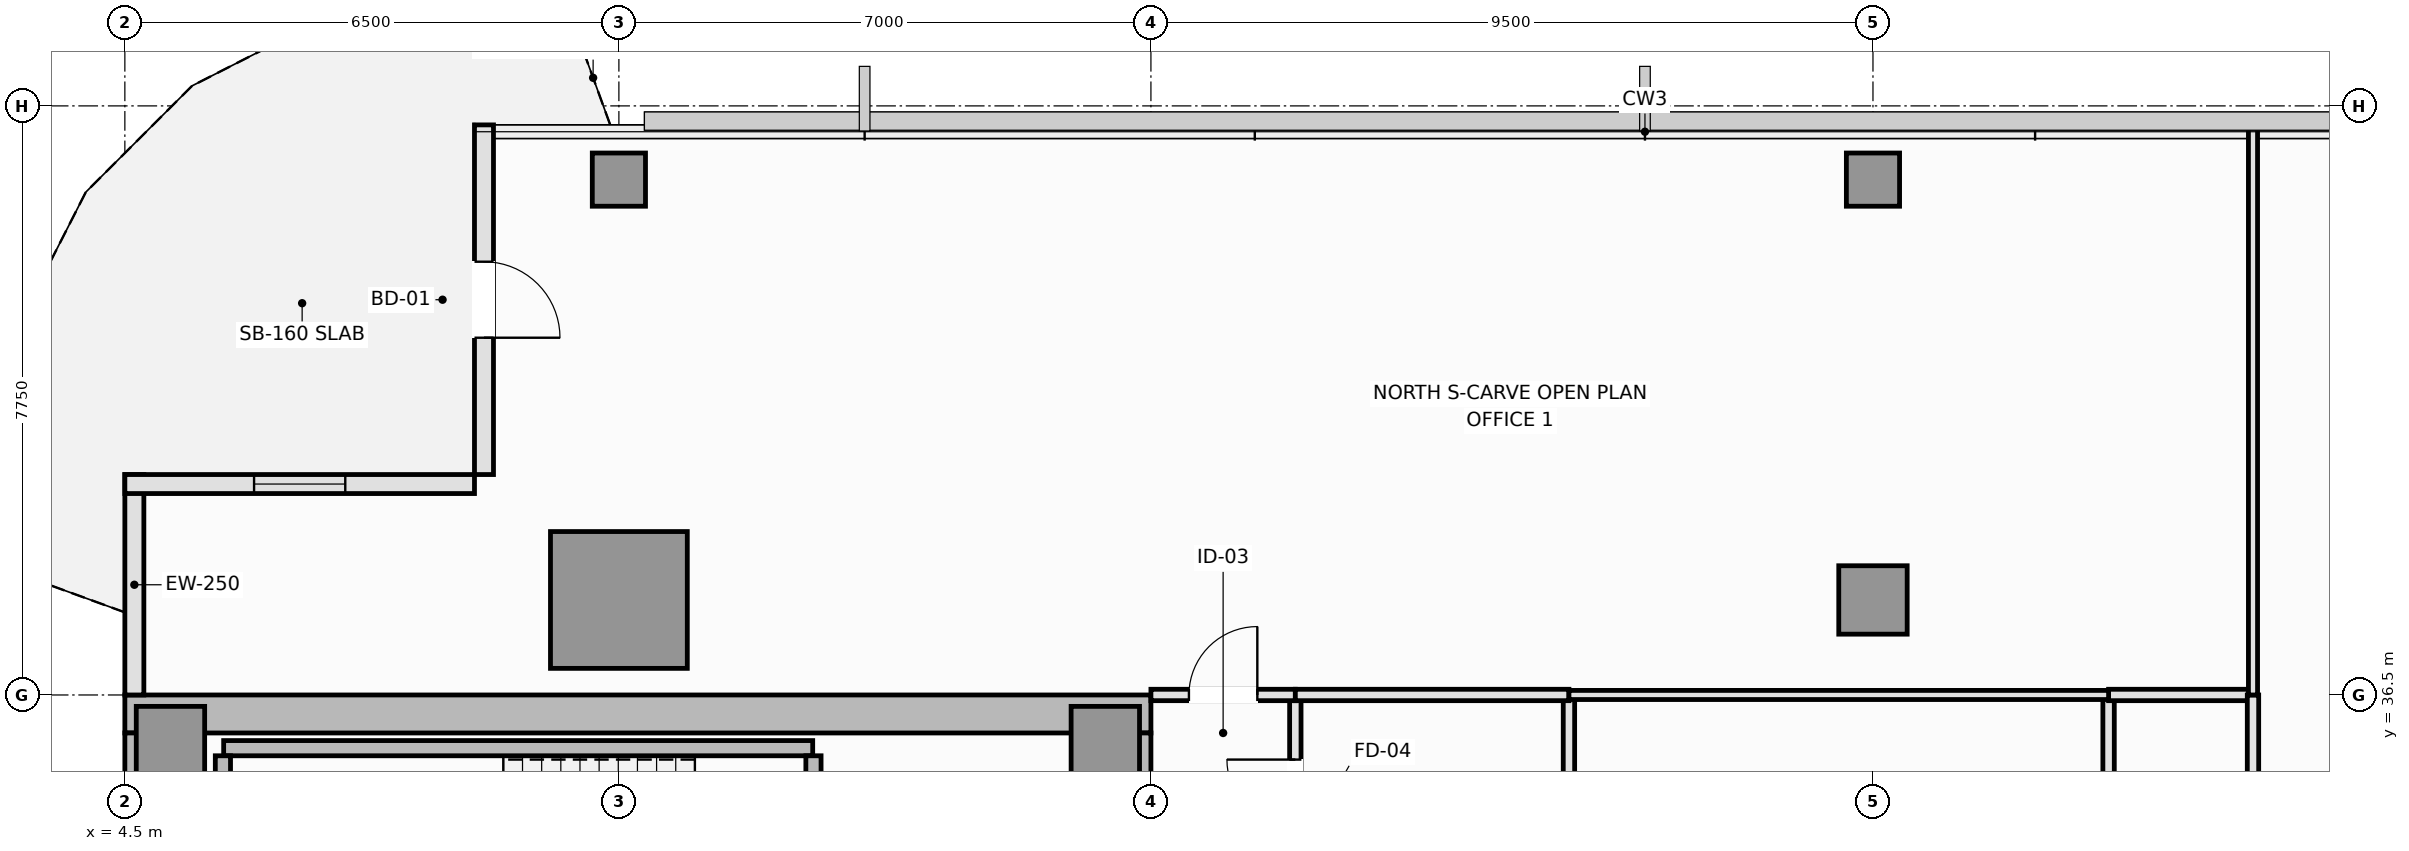
"""IFC4 building model, lengths in metres.
Left out: names, types, materials, properties, quantities, classifications, styles, units other than length and angle.
Written with IfcOpenShell. Run it as: python <this file> out.ifc"""

import sys

from ifc_helpers import new_model, si_unit, direction, frame, frame_2d, origin, origin_2d, place, context, subcontext, project, spatial, rectangle, extrude, element, fill, save


model = new_model("IFC4")
c1 = context("Model", 3, precision=1e-05, world=origin(), true_north=direction((0.0, 1.0)))
c2 = subcontext(c1, "Body", "Model", "MODEL_VIEW")
j1 = project(units=[si_unit("LENGTHUNIT", "METRE"), si_unit("PLANEANGLEUNIT", "RADIAN")], contexts=[c1])
p1 = place(None, origin())
s1 = spatial("IfcSite", under=j1, at=p1, CompositionType="ELEMENT")
p2 = place(p1, origin())
s2 = spatial("IfcBuilding", under=s1, at=p2, CompositionType="ELEMENT")
p3 = place(p2, frame((0.0, 0.0, 259.9)))
s3 = spatial("IfcBuildingStorey", under=s2, at=p3, CompositionType="ELEMENT", Elevation=259.9)
p4 = place(p3, frame((4.5, 36.25, 0.0), z_axis=(0.0, 0.0, 1.0), x_axis=(1.0, 0.0, 0.0)))
e1 = element("IfcWall", 1, at=p4, inside=s3, PredefinedType="SHEAR", context=c2, shape_type="SweptSolid", body=[
    extrude(rectangle(XDim=13.5, YDim=0.5, at=frame_2d((6.75, 0.0))), origin(), (0.0, 0.0, 1.0), 3.55),
])
p5 = place(p3, frame((4.75, 14.5, 0.0), z_axis=(0.0, 0.0, 1.0), x_axis=(0.0, 1.0, 0.0)))
e2 = element("IfcWall", 2, at=p5, inside=s3, PredefinedType="SHEAR", context=c2, shape_type="SweptSolid", body=[
    extrude(rectangle(XDim=21.5, YDim=0.5, at=frame_2d((10.75, 0.0))), origin(), (0.0, 0.0, 1.0), 3.55),
])
p6 = place(p3, frame((17.75, 27.05, 0.0), z_axis=(0.0, 0.0, 1.0), x_axis=(0.0, 1.0, 0.0)))
e3 = element("IfcWall", 3, at=p6, inside=s3, PredefinedType="SHEAR", context=c2, shape_type="SweptSolid", body=[
    extrude(rectangle(XDim=8.95, YDim=0.5, at=frame_2d((4.475, 0.0))), origin(), (0.0, 0.0, 1.0), 3.55),
])
p7 = place(p6, frame((3.45, 0.0, 0.0)))
e4 = element("IfcOpeningElement", 4, at=p7, cuts=e3, PredefinedType="OPENING", context=c2, shape_type="SweptSolid", body=[
    extrude(rectangle(XDim=1.1, YDim=2.15, at=frame_2d((0.55, 1.075))), frame((0.0, 0.26, 0.0), z_axis=(0.0, -1.0, 0.0), x_axis=(1.0, 0.0, 0.0)), (0.0, 0.0, 1.0), 0.52),
])
for number, where, z_axis, x_axis in (
    (5, (5.1, 35.9, 0.0), (0.0, 0.0, 1.0), (1.0, 0.0, 0.0)),
    (6, (17.4, 35.9, 0.0), (0.0, 0.0, 1.0), (1.0, 0.0, 0.0)),
):
    element("IfcColumn", number, at=place(p3, frame(where, z_axis=z_axis, x_axis=x_axis)), inside=s3, PredefinedType="PILASTER", context=c2, shape_type="SweptSolid", body=[
        extrude(rectangle(XDim=0.9, YDim=0.9, at=origin_2d()), origin(), (0.0, 0.0, 1.0), 3.55),
    ])
p8 = place(p3, frame((11.0, 37.75, 0.0), z_axis=(0.0, 0.0, 1.0), x_axis=(1.0, 0.0, 0.0)))
e7 = element("IfcColumn", 7, at=p8, inside=s3, PredefinedType="COLUMN", context=c2, shape_type="SweptSolid", body=[
    extrude(rectangle(XDim=1.8, YDim=1.8, at=origin_2d()), origin(), (0.0, 0.0, 1.0), 3.55),
])
p9 = place(p3, frame((27.5, 37.75, 0.0), z_axis=(0.0, 0.0, 1.0), x_axis=(1.0, 0.0, 0.0)))
e8 = element("IfcColumn", 8, at=p9, inside=s3, PredefinedType="COLUMN", context=c2, shape_type="SweptSolid", body=[
    extrude(rectangle(XDim=0.9, YDim=0.9, at=origin_2d()), origin(), (0.0, 0.0, 1.0), 3.55),
])
for number, where, z_axis, x_axis in (
    (9, (11.0, 43.28, 0.0), (0.0, 0.0, 1.0), (1.0, 0.0, 0.0)),
    (10, (27.5, 43.28, 0.0), (0.0, 0.0, 1.0), (1.0, 0.0, 0.0)),
):
    element("IfcColumn", number, at=place(p3, frame(where, z_axis=z_axis, x_axis=x_axis)), inside=s3, PredefinedType="COLUMN", context=c2, shape_type="SweptSolid", body=[
        extrude(rectangle(XDim=0.7, YDim=0.7, at=origin_2d()), origin(), (0.0, 0.0, 1.0), 3.55),
    ])
p10 = place(p3, frame((4.625, 39.4, 0.0), z_axis=(0.0, 0.0, 1.0), x_axis=(0.0, -1.0, 0.0)))
e11 = element("IfcWall", 11, at=p10, inside=s3, PredefinedType="SOLIDWALL", context=c2, shape_type="SweptSolid", body=[
    extrude(rectangle(XDim=2.9, YDim=0.25, at=frame_2d((1.45, 0.0))), origin(), (0.0, 0.0, 1.0), 3.39),
])
p11 = place(p3, frame((9.225, 44.0, 0.0), z_axis=(0.0, 0.0, 1.0), x_axis=(0.0, -1.0, 0.0)))
e12 = element("IfcWall", 12, at=p11, inside=s3, PredefinedType="SOLIDWALL", context=c2, shape_type="SweptSolid", body=[
    extrude(rectangle(XDim=4.6, YDim=0.25, at=frame_2d((2.3, 0.0))), origin(), (0.0, 0.0, 1.0), 3.39),
])
p12 = place(p11, frame((1.8, 0.0, 0.0)))
e13 = element("IfcOpeningElement", 13, at=p12, cuts=e12, PredefinedType="OPENING", context=c2, shape_type="SweptSolid", body=[
    extrude(rectangle(XDim=1.0, YDim=2.2, at=frame_2d((0.5, 1.1))), frame((0.0, 0.135, 0.0), z_axis=(0.0, -1.0, 0.0), x_axis=(1.0, 0.0, 0.0)), (0.0, 0.0, 1.0), 0.27),
])
p13 = place(p3, frame((9.1, 39.275, 0.0), z_axis=(0.0, 0.0, 1.0), x_axis=(-1.0, 0.0, 0.0)))
e14 = element("IfcWall", 14, at=p13, inside=s3, PredefinedType="SOLIDWALL", context=c2, shape_type="SweptSolid", body=[
    extrude(rectangle(XDim=4.6, YDim=0.25, at=frame_2d((2.3, 0.0))), origin(), (0.0, 0.0, 1.0), 3.12),
])
p14 = place(p13, frame((1.7, 0.0, 0.9)))
e15 = element("IfcOpeningElement", 15, at=p14, cuts=e14, PredefinedType="OPENING", context=c2, shape_type="SweptSolid", body=[
    extrude(rectangle(XDim=1.2, YDim=1.8, at=frame_2d((0.6, 0.9))), frame((0.0, 0.135, 0.0), z_axis=(0.0, -1.0, 0.0), x_axis=(1.0, 0.0, 0.0)), (0.0, 0.0, 1.0), 0.27),
])
p15 = place(p3, frame((5.8, 35.8, 0.0), z_axis=(0.0, 0.0, 1.0), x_axis=(1.0, 0.0, 0.0)))
e16 = element("IfcWall", 16, at=p15, inside=s3, PredefinedType="SOLIDWALL", context=c2, shape_type="SweptSolid", body=[
    extrude(rectangle(XDim=7.75, YDim=0.2, at=frame_2d((3.875, 0.0))), origin(), (0.0, 0.0, 1.0), 3.55),
])
p16 = place(p3, frame((5.79, 32.65, 0.0), z_axis=(0.0, 0.0, 1.0), x_axis=(0.0, 1.0, 0.0)))
e17 = element("IfcWall", 17, at=p16, inside=s3, PredefinedType="SOLIDWALL", context=c2, shape_type="SweptSolid", body=[
    extrude(rectangle(XDim=3.05, YDim=0.2, at=frame_2d((1.525, 0.0))), origin(), (0.0, 0.0, 1.0), 3.55),
])
p17 = place(p3, frame((13.56, 32.65, 0.0), z_axis=(0.0, 0.0, 1.0), x_axis=(0.0, 1.0, 0.0)))
e18 = element("IfcWall", 18, at=p17, inside=s3, PredefinedType="SOLIDWALL", context=c2, shape_type="SweptSolid", body=[
    extrude(rectangle(XDim=3.05, YDim=0.2, at=frame_2d((1.525, 0.0))), origin(), (0.0, 0.0, 1.0), 3.55),
])
p18 = place(p17, frame((0.95, 0.0, 0.0)))
e19 = element("IfcOpeningElement", 19, at=p18, cuts=e18, PredefinedType="OPENING", context=c2, shape_type="SweptSolid", body=[
    extrude(rectangle(XDim=1.15, YDim=2.15, at=frame_2d((0.575, 1.075))), frame((0.0, 0.11, 0.0), z_axis=(0.0, -1.0, 0.0), x_axis=(1.0, 0.0, 0.0)), (0.0, 0.0, 1.0), 0.22),
])
p19 = place(p3, frame((19.9, 33.9, 0.0), z_axis=(0.0, 0.0, 1.0), x_axis=(0.0, 1.0, 0.0)))
e20 = element("IfcWall", 20, at=p19, inside=s3, PredefinedType="PLUMBINGWALL", context=c2, shape_type="SweptSolid", body=[
    extrude(rectangle(XDim=2.6, YDim=0.15, at=frame_2d((1.3, 0.0))), origin(), (0.0, 0.0, 1.0), 3.39),
])
p20 = place(p19, frame((0.85, 0.0, 0.0)))
e21 = element("IfcOpeningElement", 21, at=p20, cuts=e20, PredefinedType="OPENING", context=c2, shape_type="SweptSolid", body=[
    extrude(rectangle(XDim=0.9, YDim=2.1, at=frame_2d((0.45, 1.05))), frame((0.0, 0.085, 0.0), z_axis=(0.0, -1.0, 0.0), x_axis=(1.0, 0.0, 0.0)), (0.0, 0.0, 1.0), 0.17),
])
p21 = place(p3, frame((18.0, 36.5, 0.0), z_axis=(0.0, 0.0, 1.0), x_axis=(1.0, 0.0, 0.0)))
e22 = element("IfcWall", 22, at=p21, inside=s3, PredefinedType="PARTITIONING", context=c2, shape_type="SweptSolid", body=[
    extrude(rectangle(XDim=1.9, YDim=0.15, at=frame_2d((0.95, 0.0))), origin(), (0.0, 0.0, 1.0), 3.39),
])
p22 = place(p21, frame((0.5, 0.0, 0.0)))
e23 = element("IfcOpeningElement", 23, at=p22, cuts=e22, PredefinedType="OPENING", context=c2, shape_type="SweptSolid", body=[
    extrude(rectangle(XDim=0.9, YDim=2.1, at=frame_2d((0.45, 1.05))), frame((0.0, 0.085, 0.0), z_axis=(0.0, -1.0, 0.0), x_axis=(1.0, 0.0, 0.0)), (0.0, 0.0, 1.0), 0.17),
])
p23 = place(p3, frame((30.6, 31.8, 0.0), z_axis=(0.0, 0.0, 1.0), x_axis=(0.0, 1.0, 0.0)))
e24 = element("IfcWall", 24, at=p23, inside=s3, PredefinedType="PARTITIONING", context=c2, shape_type="SweptSolid", body=[
    extrude(rectangle(XDim=4.7, YDim=0.15, at=frame_2d((2.35, 0.0))), origin(), (0.0, 0.0, 1.0), 3.39),
])
p24 = place(p23, frame((1.85, 0.0, 0.0)))
e25 = element("IfcOpeningElement", 25, at=p24, cuts=e24, PredefinedType="OPENING", context=c2, shape_type="SweptSolid", body=[
    extrude(rectangle(XDim=1.0, YDim=2.15, at=frame_2d((0.5, 1.075))), frame((0.0, 0.085, 0.0), z_axis=(0.0, -1.0, 0.0), x_axis=(1.0, 0.0, 0.0)), (0.0, 0.0, 1.0), 0.17),
])
p25 = place(p3, frame((30.6, 36.5, 0.0), z_axis=(0.0, 0.0, 1.0), x_axis=(1.0, 0.0, 0.0)))
e26 = element("IfcWall", 26, at=p25, inside=s3, PredefinedType="PARTITIONING", context=c2, shape_type="SweptSolid", body=[
    extrude(rectangle(XDim=1.9, YDim=0.15, at=frame_2d((0.95, 0.0))), origin(), (0.0, 0.0, 1.0), 3.39),
])
p26 = place(p3, frame((32.5, 25.25, 0.0), z_axis=(0.0, 0.0, 1.0), x_axis=(0.0, 1.0, 0.0)))
e27 = element("IfcWall", 27, at=p26, inside=s3, PredefinedType="PARTITIONING", context=c2, shape_type="SweptSolid", body=[
    extrude(rectangle(XDim=11.25, YDim=0.15, at=frame_2d((5.625, 0.0))), origin(), (0.0, 0.0, 1.0), 3.12),
])
p27 = place(p26, frame((5.125, 0.0, 0.0)))
e28 = element("IfcOpeningElement", 28, at=p27, cuts=e27, PredefinedType="OPENING", context=c2, shape_type="SweptSolid", body=[
    extrude(rectangle(XDim=1.0, YDim=2.15, at=frame_2d((0.5, 1.075))), frame((0.0, 0.085, 0.0), z_axis=(0.0, -1.0, 0.0), x_axis=(1.0, 0.0, 0.0)), (0.0, 0.0, 1.0), 0.17),
])
p28 = place(p3, frame((23.5, 33.9, 0.0), z_axis=(0.0, 0.0, 1.0), x_axis=(0.0, 1.0, 0.0)))
e29 = element("IfcWall", 29, at=p28, inside=s3, PredefinedType="PLUMBINGWALL", context=c2, shape_type="SweptSolid", body=[
    extrude(rectangle(XDim=2.6, YDim=0.15, at=frame_2d((1.3, 0.0))), origin(), (0.0, 0.0, 1.0), 3.39),
])
p29 = place(p3, frame((19.9, 36.5, 0.0), z_axis=(0.0, 0.0, 1.0), x_axis=(1.0, 0.0, 0.0)))
e30 = element("IfcWall", 30, at=p29, inside=s3, PredefinedType="PLUMBINGWALL", context=c2, shape_type="SweptSolid", body=[
    extrude(rectangle(XDim=3.6, YDim=0.15, at=frame_2d((1.8, 0.0))), origin(), (0.0, 0.0, 1.0), 3.39),
])
p30 = place(p3, frame((23.5, 36.5, 0.0), z_axis=(0.0, 0.0, 1.0), x_axis=(1.0, 0.0, 0.0)))
e31 = element("IfcWall", 31, at=p30, inside=s3, PredefinedType="PARTITIONING", context=c2, shape_type="SweptSolid", body=[
    extrude(rectangle(XDim=7.1, YDim=0.12, at=frame_2d((3.55, 0.0))), origin(), (0.0, 0.0, 1.0), 3.39),
])
p31 = place(p3, frame((32.5, 36.5, 0.0), z_axis=(0.0, 0.0, 1.0), x_axis=(0.0, 1.0, 0.0)))
e32 = element("IfcWall", 32, at=p31, inside=s3, PredefinedType="PARTITIONING", context=c2, shape_type="SweptSolid", body=[
    extrude(rectangle(XDim=7.49, YDim=0.12, at=frame_2d((3.745, 0.0))), origin(), (0.0, 0.0, 1.0), 3.12),
])
p32 = place(p12, frame((1.0, 0.0, 0.0), z_axis=(0.0, 0.0, 1.0), x_axis=(-1.0, 0.0, 0.0)))
e33 = element("IfcDoor", 33, at=p32, inside=s3, OperationType="SINGLE_SWING_RIGHT", PredefinedType="DOOR", context=c2, shape_type="SweptSolid", body=[
    extrude(rectangle(XDim=1.0, YDim=2.2, at=frame_2d((0.5, 1.1))), frame((0.0, 0.025, 0.0), z_axis=(0.0, -1.0, 0.0), x_axis=(1.0, 0.0, 0.0)), (0.0, 0.0, 1.0), 0.05),
])
fill(e13, e33)
p33 = place(p14, origin())
e34 = element("IfcWindow", 34, at=p33, inside=s3, PartitioningType="SINGLE_PANEL", PredefinedType="WINDOW", context=c2, shape_type="SweptSolid", body=[
    extrude(rectangle(XDim=1.2, YDim=1.8, at=frame_2d((0.6, 0.9))), frame((0.0, 0.03, 0.0), z_axis=(0.0, -1.0, 0.0), x_axis=(1.0, 0.0, 0.0)), (0.0, 0.0, 1.0), 0.06),
])
fill(e15, e34)
p34 = place(p20, origin())
e35 = element("IfcDoor", 35, at=p34, inside=s3, OperationType="SINGLE_SWING_RIGHT", PredefinedType="DOOR", context=c2, shape_type="SweptSolid", body=[
    extrude(rectangle(XDim=0.9, YDim=2.1, at=frame_2d((0.45, 1.05))), frame((0.0, 0.025, 0.0), z_axis=(0.0, -1.0, 0.0), x_axis=(1.0, 0.0, 0.0)), (0.0, 0.0, 1.0), 0.05),
])
fill(e21, e35)
p35 = place(p22, origin())
e36 = element("IfcDoor", 36, at=p35, inside=s3, OperationType="SINGLE_SWING_RIGHT", PredefinedType="DOOR", context=c2, shape_type="SweptSolid", body=[
    extrude(rectangle(XDim=0.9, YDim=2.1, at=frame_2d((0.45, 1.05))), frame((0.0, 0.025, 0.0), z_axis=(0.0, -1.0, 0.0), x_axis=(1.0, 0.0, 0.0)), (0.0, 0.0, 1.0), 0.05),
])
fill(e23, e36)
save(model, sys.argv[1])
